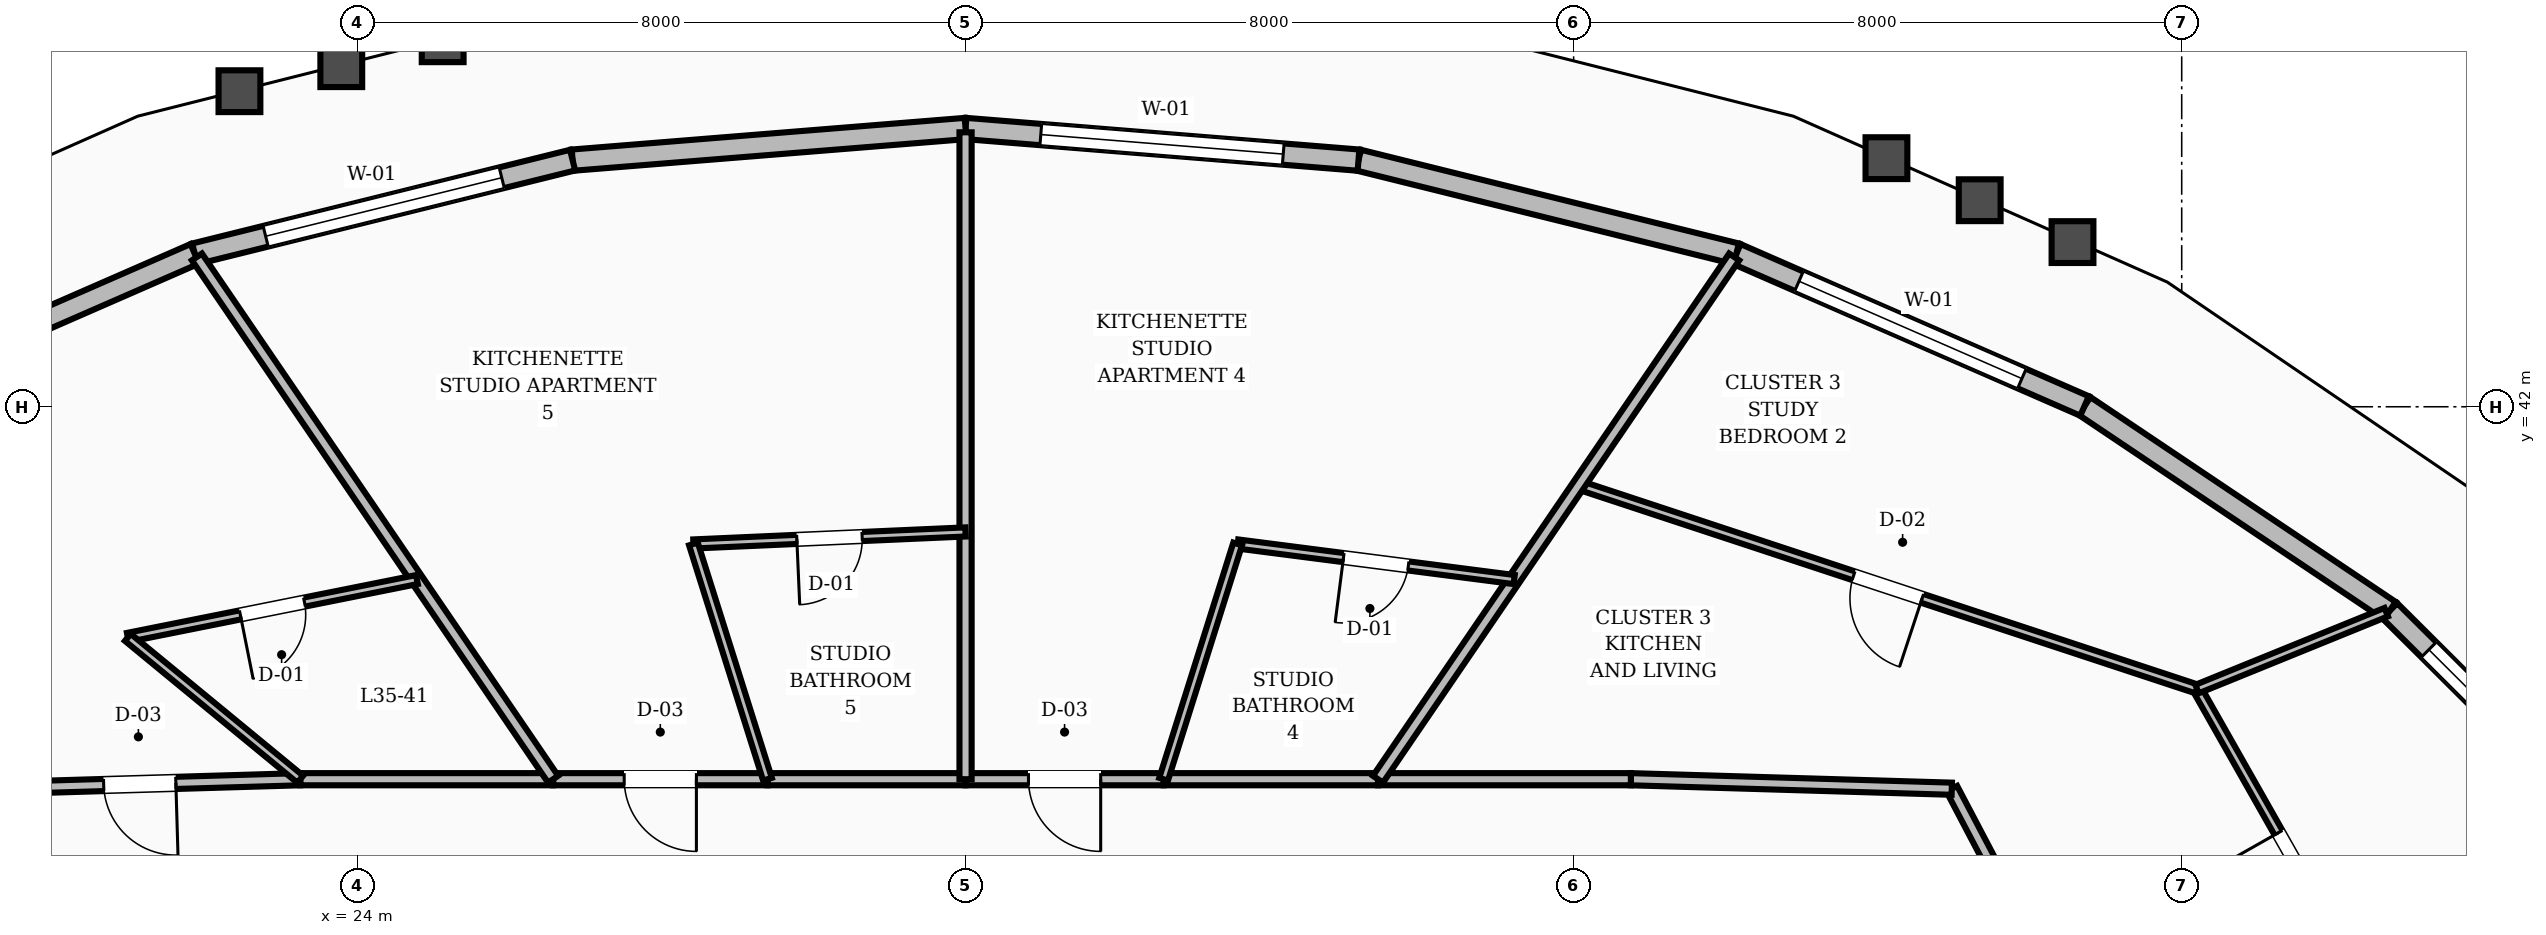
"""IFC4 building model, lengths in metres.
Left out: names, types, materials, properties, quantities, classifications, styles, units other than length and angle.
Written with IfcOpenShell. Run it as: python <this file> out.ifc"""

import sys

from ifc_helpers import new_model, si_unit, direction, frame, frame_2d, origin, place, context, subcontext, project, spatial, rectangle, extrude, element, fill, save


model = new_model("IFC4")
c1 = context("Model", 3, precision=1e-05, world=origin(), true_north=direction((0.0, 1.0)))
c2 = subcontext(c1, "Body", "Model", "MODEL_VIEW")
j1 = project(units=[si_unit("LENGTHUNIT", "METRE"), si_unit("PLANEANGLEUNIT", "RADIAN")], contexts=[c1])
p1 = place(None, origin())
s1 = spatial("IfcSite", under=j1, at=p1, CompositionType="ELEMENT")
p2 = place(p1, origin())
s2 = spatial("IfcBuilding", under=s1, at=p2, CompositionType="ELEMENT")
p3 = place(p2, frame((0.0, 0.0, 138.8)))
s3 = spatial("IfcBuildingStorey", under=s2, at=p3, CompositionType="ELEMENT", Elevation=138.8)
p4 = place(p3, frame((54.032, 36.034, 0.0), z_axis=(0.0, 0.0, 1.0), x_axis=(-0.708522616078, 0.705688105686, 0.0)))
e1 = element("IfcWall", 1, at=p4, inside=s3, PredefinedType="STANDARD", context=c2, shape_type="SweptSolid", body=[
    extrude(rectangle(XDim=4.651, YDim=0.28, at=frame_2d((2.326, 0.0))), origin(), (0.0, 0.0, 1.0), 2.82),
])
p5 = place(p4, frame((0.726, 0.0, 0.8)))
e2 = element("IfcOpeningElement", 2, at=p5, cuts=e1, PredefinedType="OPENING", context=c2, shape_type="SweptSolid", body=[
    extrude(rectangle(XDim=3.2, YDim=1.65, at=frame_2d((1.6, 0.825))), frame((0.0, 0.15, 0.0), z_axis=(0.0, -1.0, 0.0), x_axis=(1.0, 0.0, 0.0)), (0.0, 0.0, 1.0), 0.3),
])
p6 = place(p3, frame((50.737, 39.316, 0.0), z_axis=(0.0, 0.0, 1.0), x_axis=(-0.830431041812, 0.557121427334, 0.0)))
e3 = element("IfcWall", 3, at=p6, inside=s3, PredefinedType="STANDARD", context=c2, shape_type="SweptSolid", body=[
    extrude(rectangle(XDim=4.835, YDim=0.28, at=frame_2d((2.417, 0.0))), origin(), (0.0, 0.0, 1.0), 2.82),
])
p7 = place(p3, frame((46.722, 42.01, 0.0), z_axis=(0.0, 0.0, 1.0), x_axis=(-0.916348879192, 0.400380733307, 0.0)))
e4 = element("IfcWall", 4, at=p7, inside=s3, PredefinedType="STANDARD", context=c2, shape_type="SweptSolid", body=[
    extrude(rectangle(XDim=5.0, YDim=0.28, at=frame_2d((2.5, 0.0))), origin(), (0.0, 0.0, 1.0), 2.82),
])
p8 = place(p7, frame((0.9, 0.0, 0.8)))
e5 = element("IfcOpeningElement", 5, at=p8, cuts=e4, PredefinedType="OPENING", context=c2, shape_type="SweptSolid", body=[
    extrude(rectangle(XDim=3.2, YDim=1.65, at=frame_2d((1.6, 0.825))), frame((0.0, 0.15, 0.0), z_axis=(0.0, -1.0, 0.0), x_axis=(1.0, 0.0, 0.0)), (0.0, 0.0, 1.0), 0.3),
])
p9 = place(p3, frame((42.14, 44.012, 0.0), z_axis=(0.0, 0.0, 1.0), x_axis=(-0.970600650036, 0.240695613066, 0.0)))
e6 = element("IfcWall", 6, at=p9, inside=s3, PredefinedType="STANDARD", context=c2, shape_type="SweptSolid", body=[
    extrude(rectangle(XDim=5.121, YDim=0.28, at=frame_2d((2.561, 0.0))), origin(), (0.0, 0.0, 1.0), 2.82),
])
p10 = place(p3, frame((37.17, 45.245, 0.0), z_axis=(0.0, 0.0, 1.0), x_axis=(-0.996773984809, 0.080259723452, 0.0)))
e7 = element("IfcWall", 7, at=p10, inside=s3, PredefinedType="STANDARD", context=c2, shape_type="SweptSolid", body=[
    extrude(rectangle(XDim=5.187, YDim=0.28, at=frame_2d((2.593, 0.0))), origin(), (0.0, 0.0, 1.0), 2.82),
])
p11 = place(p10, frame((0.993, 0.0, 0.8)))
e8 = element("IfcOpeningElement", 8, at=p11, cuts=e7, PredefinedType="OPENING", context=c2, shape_type="SweptSolid", body=[
    extrude(rectangle(XDim=3.2, YDim=1.65, at=frame_2d((1.6, 0.825))), frame((0.0, 0.15, 0.0), z_axis=(0.0, -1.0, 0.0), x_axis=(1.0, 0.0, 0.0)), (0.0, 0.0, 1.0), 0.3),
])
p12 = place(p3, frame((32.0, 45.661, 0.0), z_axis=(0.0, 0.0, 1.0), x_axis=(-0.996773984809, -0.080259723452, 0.0)))
e9 = element("IfcWall", 9, at=p12, inside=s3, PredefinedType="STANDARD", context=c2, shape_type="SweptSolid", body=[
    extrude(rectangle(XDim=5.187, YDim=0.28, at=frame_2d((2.593, 0.0))), origin(), (0.0, 0.0, 1.0), 2.82),
])
p13 = place(p3, frame((26.83, 45.245, 0.0), z_axis=(0.0, 0.0, 1.0), x_axis=(-0.970600650036, -0.240695613066, 0.0)))
e10 = element("IfcWall", 10, at=p13, inside=s3, PredefinedType="STANDARD", context=c2, shape_type="SweptSolid", body=[
    extrude(rectangle(XDim=5.121, YDim=0.28, at=frame_2d((2.561, 0.0))), origin(), (0.0, 0.0, 1.0), 2.82),
])
p14 = place(p13, frame((0.961, 0.0, 0.8)))
e11 = element("IfcOpeningElement", 11, at=p14, cuts=e10, PredefinedType="OPENING", context=c2, shape_type="SweptSolid", body=[
    extrude(rectangle(XDim=3.2, YDim=1.65, at=frame_2d((1.6, 0.825))), frame((0.0, 0.15, 0.0), z_axis=(0.0, -1.0, 0.0), x_axis=(1.0, 0.0, 0.0)), (0.0, 0.0, 1.0), 0.3),
])
p15 = place(p3, frame((21.86, 44.012, 0.0), z_axis=(0.0, 0.0, 1.0), x_axis=(-0.916348879192, -0.400380733307, 0.0)))
e12 = element("IfcWall", 12, at=p15, inside=s3, PredefinedType="STANDARD", context=c2, shape_type="SweptSolid", body=[
    extrude(rectangle(XDim=5.0, YDim=0.28, at=frame_2d((2.5, 0.0))), origin(), (0.0, 0.0, 1.0), 2.82),
])
p16 = place(p3, frame((46.65, 33.789, 0.0), z_axis=(0.0, 0.0, 1.0), x_axis=(-0.46527115782, 0.885168204185, 0.0)))
e13 = element("IfcWall", 13, at=p16, inside=s3, PredefinedType="SOLIDWALL", context=c2, shape_type="SweptSolid", body=[
    extrude(rectangle(XDim=3.6, YDim=0.16, at=frame_2d((1.8, 0.0))), origin(), (0.0, 0.0, 1.0), 2.8),
])
p17 = place(p16, frame((1.3, 0.0, 0.0)))
e14 = element("IfcOpeningElement", 14, at=p17, cuts=e13, PredefinedType="OPENING", context=c2, shape_type="SweptSolid", body=[
    extrude(rectangle(XDim=1.0, YDim=2.1, at=frame_2d((0.5, 1.05))), frame((0.0, 0.09, 0.0), z_axis=(0.0, -1.0, 0.0), x_axis=(1.0, 0.0, 0.0)), (0.0, 0.0, 1.0), 0.18),
])
p18 = place(p3, frame((44.975, 36.975, 0.0), z_axis=(0.0, 0.0, 1.0), x_axis=(-0.999561990195, 0.029594387265, 0.0)))
e15 = element("IfcWall", 15, at=p18, inside=s3, PredefinedType="SOLIDWALL", context=c2, shape_type="SweptSolid", body=[
    extrude(rectangle(XDim=4.224, YDim=0.16, at=frame_2d((2.112, 0.0))), origin(), (0.0, 0.0, 1.0), 2.8),
])
p19 = place(p3, frame((40.753, 37.1, 0.0), z_axis=(0.0, 0.0, 1.0), x_axis=(-1.0, 0.0, 0.0)))
e16 = element("IfcWall", 16, at=p19, inside=s3, PredefinedType="SOLIDWALL", context=c2, shape_type="SweptSolid", body=[
    extrude(rectangle(XDim=3.327, YDim=0.16, at=frame_2d((1.664, 0.0))), origin(), (0.0, 0.0, 1.0), 2.8),
])
p20 = place(p3, frame((37.426, 37.1, 0.0), z_axis=(0.0, 0.0, 1.0), x_axis=(-1.0, 0.0, 0.0)))
e17 = element("IfcWall", 17, at=p20, inside=s3, PredefinedType="SOLIDWALL", context=c2, shape_type="SweptSolid", body=[
    extrude(rectangle(XDim=2.821, YDim=0.16, at=frame_2d((1.41, 0.0))), origin(), (0.0, 0.0, 1.0), 2.8),
])
p21 = place(p3, frame((34.606, 37.1, 0.0), z_axis=(0.0, 0.0, 1.0), x_axis=(-1.0, 0.0, 0.0)))
e18 = element("IfcWall", 18, at=p21, inside=s3, PredefinedType="SOLIDWALL", context=c2, shape_type="SweptSolid", body=[
    extrude(rectangle(XDim=2.606, YDim=0.16, at=frame_2d((1.303, 0.0))), origin(), (0.0, 0.0, 1.0), 2.8),
])
p22 = place(p21, frame((0.828, 0.0, 0.0)))
e19 = element("IfcOpeningElement", 19, at=p22, cuts=e18, PredefinedType="OPENING", context=c2, shape_type="SweptSolid", body=[
    extrude(rectangle(XDim=0.95, YDim=2.1, at=frame_2d((0.475, 1.05))), frame((0.0, 0.09, 0.0), z_axis=(0.0, -1.0, 0.0), x_axis=(1.0, 0.0, 0.0)), (0.0, 0.0, 1.0), 0.18),
])
p23 = place(p3, frame((32.0, 37.1, 0.0), z_axis=(0.0, 0.0, 1.0), x_axis=(-1.0, 0.0, 0.0)))
e20 = element("IfcWall", 20, at=p23, inside=s3, PredefinedType="SOLIDWALL", context=c2, shape_type="SweptSolid", body=[
    extrude(rectangle(XDim=2.606, YDim=0.16, at=frame_2d((1.303, 0.0))), origin(), (0.0, 0.0, 1.0), 2.8),
])
p24 = place(p3, frame((29.394, 37.1, 0.0), z_axis=(0.0, 0.0, 1.0), x_axis=(-1.0, 0.0, 0.0)))
e21 = element("IfcWall", 21, at=p24, inside=s3, PredefinedType="SOLIDWALL", context=c2, shape_type="SweptSolid", body=[
    extrude(rectangle(XDim=2.821, YDim=0.16, at=frame_2d((1.41, 0.0))), origin(), (0.0, 0.0, 1.0), 2.8),
])
p25 = place(p24, frame((0.935, 0.0, 0.0)))
e22 = element("IfcOpeningElement", 22, at=p25, cuts=e21, PredefinedType="OPENING", context=c2, shape_type="SweptSolid", body=[
    extrude(rectangle(XDim=0.95, YDim=2.1, at=frame_2d((0.475, 1.05))), frame((0.0, 0.09, 0.0), z_axis=(0.0, -1.0, 0.0), x_axis=(1.0, 0.0, 0.0)), (0.0, 0.0, 1.0), 0.18),
])
p26 = place(p3, frame((26.574, 37.1, 0.0), z_axis=(0.0, 0.0, 1.0), x_axis=(-1.0, 0.0, 0.0)))
e23 = element("IfcWall", 23, at=p26, inside=s3, PredefinedType="SOLIDWALL", context=c2, shape_type="SweptSolid", body=[
    extrude(rectangle(XDim=3.327, YDim=0.16, at=frame_2d((1.664, 0.0))), origin(), (0.0, 0.0, 1.0), 2.8),
])
p27 = place(p3, frame((23.247, 37.1, 0.0), z_axis=(0.0, 0.0, 1.0), x_axis=(-0.999561990195, -0.029594387265, 0.0)))
e24 = element("IfcWall", 24, at=p27, inside=s3, PredefinedType="SOLIDWALL", context=c2, shape_type="SweptSolid", body=[
    extrude(rectangle(XDim=4.224, YDim=0.16, at=frame_2d((2.112, 0.0))), origin(), (0.0, 0.0, 1.0), 2.8),
])
p28 = place(p27, frame((1.637, 0.0, 0.0)))
e25 = element("IfcOpeningElement", 25, at=p28, cuts=e24, PredefinedType="OPENING", context=c2, shape_type="SweptSolid", body=[
    extrude(rectangle(XDim=0.95, YDim=2.1, at=frame_2d((0.475, 1.05))), frame((0.0, 0.09, 0.0), z_axis=(0.0, -1.0, 0.0), x_axis=(1.0, 0.0, 0.0)), (0.0, 0.0, 1.0), 0.18),
])
p29 = place(p3, frame((52.156, 31.312, 0.0), z_axis=(0.0, 0.0, 1.0), x_axis=(-0.493164704103, 0.869935960072, 0.0)))
e26 = element("IfcWall", 26, at=p29, inside=s3, PredefinedType="PARTITIONING", context=c2, shape_type="SweptSolid", body=[
    extrude(rectangle(XDim=8.017, YDim=0.12, at=frame_2d((4.008, 0.0))), origin(), (0.0, 0.0, 1.0), 2.8),
])
p30 = place(p29, frame((4.895, 0.0, 0.0)))
e27 = element("IfcOpeningElement", 27, at=p30, cuts=e26, PredefinedType="OPENING", context=c2, shape_type="SweptSolid", body=[
    extrude(rectangle(XDim=0.95, YDim=2.1, at=frame_2d((0.475, 1.05))), frame((0.0, 0.07, 0.0), z_axis=(0.0, -1.0, 0.0), x_axis=(1.0, 0.0, 0.0)), (0.0, 0.0, 1.0), 0.14),
])
p31 = place(p3, frame((48.202, 38.286, 0.0), z_axis=(0.0, 0.0, 1.0), x_axis=(-0.949636450875, 0.313353811482, 0.0)))
e28 = element("IfcWall", 28, at=p31, inside=s3, PredefinedType="PARTITIONING", context=c2, shape_type="SweptSolid", body=[
    extrude(rectangle(XDim=8.567, YDim=0.12, at=frame_2d((4.284, 0.0))), origin(), (0.0, 0.0, 1.0), 2.8),
])
p32 = place(p31, frame((3.809, 0.0, 0.0)))
e29 = element("IfcOpeningElement", 29, at=p32, cuts=e28, PredefinedType="OPENING", context=c2, shape_type="SweptSolid", body=[
    extrude(rectangle(XDim=0.95, YDim=2.1, at=frame_2d((0.475, 1.05))), frame((0.0, 0.07, 0.0), z_axis=(0.0, -1.0, 0.0), x_axis=(1.0, 0.0, 0.0)), (0.0, 0.0, 1.0), 0.14),
])
p33 = place(p3, frame((48.202, 38.286, 0.0), z_axis=(0.0, 0.0, 1.0), x_axis=(0.926425973207, 0.376476979598, 0.0)))
e30 = element("IfcWall", 30, at=p33, inside=s3, PredefinedType="PARTITIONING", context=c2, shape_type="SweptSolid", body=[
    extrude(rectangle(XDim=2.687, YDim=0.12, at=frame_2d((1.343, 0.0))), origin(), (0.0, 0.0, 1.0), 2.8),
])
p34 = place(p3, frame((37.426, 37.1, 0.0), z_axis=(0.0, 0.0, 1.0), x_axis=(0.563462523852, 0.826141624792, 0.0)))
e31 = element("IfcWall", 31, at=p34, inside=s3, PredefinedType="SOLIDWALL", context=c2, shape_type="SweptSolid", body=[
    extrude(rectangle(XDim=8.316, YDim=0.16, at=frame_2d((4.158, 0.0))), origin(), (0.0, 0.0, 1.0), 2.8),
])
p35 = place(p3, frame((39.218, 39.727, 0.0), z_axis=(0.0, 0.0, 1.0), x_axis=(-0.991815435092, 0.127679844587, 0.0)))
e32 = element("IfcWall", 32, at=p35, inside=s3, PredefinedType="PARTITIONING", context=c2, shape_type="SweptSolid", body=[
    extrude(rectangle(XDim=3.667, YDim=0.12, at=frame_2d((1.834, 0.0))), origin(), (0.0, 0.0, 1.0), 2.8),
])
p36 = place(p35, frame((1.404, 0.0, 0.0)))
e33 = element("IfcOpeningElement", 33, at=p36, cuts=e32, PredefinedType="OPENING", context=c2, shape_type="SweptSolid", body=[
    extrude(rectangle(XDim=0.86, YDim=2.1, at=frame_2d((0.43, 1.05))), frame((0.0, 0.07, 0.0), z_axis=(0.0, -1.0, 0.0), x_axis=(1.0, 0.0, 0.0)), (0.0, 0.0, 1.0), 0.14),
])
p37 = place(p3, frame((34.606, 37.1, 0.0), z_axis=(0.0, 0.0, 1.0), x_axis=(0.30031376725, 0.953840469471, 0.0)))
e34 = element("IfcWall", 34, at=p37, inside=s3, PredefinedType="PARTITIONING", context=c2, shape_type="SweptSolid", body=[
    extrude(rectangle(XDim=3.244, YDim=0.12, at=frame_2d((1.622, 0.0))), origin(), (0.0, 0.0, 1.0), 2.8),
])
p38 = place(p3, frame((32.0, 37.1, 0.0), z_axis=(0.0, 0.0, 1.0), x_axis=(0.0, 1.0, 0.0)))
e35 = element("IfcWall", 35, at=p38, inside=s3, PredefinedType="SOLIDWALL", context=c2, shape_type="SweptSolid", body=[
    extrude(rectangle(XDim=8.511, YDim=0.16, at=frame_2d((4.255, 0.0))), origin(), (0.0, 0.0, 1.0), 2.8),
])
p39 = place(p3, frame((32.0, 40.353, 0.0), z_axis=(0.0, 0.0, 1.0), x_axis=(-0.999025056088, -0.044146770073, 0.0)))
e36 = element("IfcWall", 36, at=p39, inside=s3, PredefinedType="PARTITIONING", context=c2, shape_type="SweptSolid", body=[
    extrude(rectangle(XDim=3.583, YDim=0.12, at=frame_2d((1.792, 0.0))), origin(), (0.0, 0.0, 1.0), 2.8),
])
p40 = place(p39, frame((1.362, 0.0, 0.0)))
e37 = element("IfcOpeningElement", 37, at=p40, cuts=e36, PredefinedType="OPENING", context=c2, shape_type="SweptSolid", body=[
    extrude(rectangle(XDim=0.86, YDim=2.1, at=frame_2d((0.43, 1.05))), frame((0.0, 0.07, 0.0), z_axis=(0.0, -1.0, 0.0), x_axis=(1.0, 0.0, 0.0)), (0.0, 0.0, 1.0), 0.14),
])
p41 = place(p3, frame((29.394, 37.1, 0.0), z_axis=(0.0, 0.0, 1.0), x_axis=(-0.30031376725, 0.953840469471, 0.0)))
e38 = element("IfcWall", 38, at=p41, inside=s3, PredefinedType="PARTITIONING", context=c2, shape_type="SweptSolid", body=[
    extrude(rectangle(XDim=3.244, YDim=0.12, at=frame_2d((1.622, 0.0))), origin(), (0.0, 0.0, 1.0), 2.8),
])
p42 = place(p3, frame((26.574, 37.1, 0.0), z_axis=(0.0, 0.0, 1.0), x_axis=(-0.563462523852, 0.826141624792, 0.0)))
e39 = element("IfcWall", 39, at=p42, inside=s3, PredefinedType="SOLIDWALL", context=c2, shape_type="SweptSolid", body=[
    extrude(rectangle(XDim=8.316, YDim=0.16, at=frame_2d((4.158, 0.0))), origin(), (0.0, 0.0, 1.0), 2.8),
])
p43 = place(p3, frame((24.782, 39.727, 0.0), z_axis=(0.0, 0.0, 1.0), x_axis=(-0.980580675691, -0.196116135138, 0.0)))
e40 = element("IfcWall", 40, at=p43, inside=s3, PredefinedType="PARTITIONING", context=c2, shape_type="SweptSolid", body=[
    extrude(rectangle(XDim=3.879, YDim=0.12, at=frame_2d((1.939, 0.0))), origin(), (0.0, 0.0, 1.0), 2.8),
])
p44 = place(p43, frame((1.51, 0.0, 0.0)))
e41 = element("IfcOpeningElement", 41, at=p44, cuts=e40, PredefinedType="OPENING", context=c2, shape_type="SweptSolid", body=[
    extrude(rectangle(XDim=0.86, YDim=2.1, at=frame_2d((0.43, 1.05))), frame((0.0, 0.07, 0.0), z_axis=(0.0, -1.0, 0.0), x_axis=(1.0, 0.0, 0.0)), (0.0, 0.0, 1.0), 0.14),
])
p45 = place(p3, frame((23.247, 37.1, 0.0), z_axis=(0.0, 0.0, 1.0), x_axis=(-0.772280465458, 0.63528173488, 0.0)))
e42 = element("IfcWall", 42, at=p45, inside=s3, PredefinedType="PARTITIONING", context=c2, shape_type="SweptSolid", body=[
    extrude(rectangle(XDim=2.937, YDim=0.12, at=frame_2d((1.468, 0.0))), origin(), (0.0, 0.0, 1.0), 2.8),
])
p46 = place(p5, origin())
e43 = element("IfcWindow", 43, at=p46, inside=s3, PartitioningType="SINGLE_PANEL", PredefinedType="WINDOW", context=c2, shape_type="SweptSolid", body=[
    extrude(rectangle(XDim=3.2, YDim=1.65, at=frame_2d((1.6, 0.825))), frame((0.0, 0.03, 0.0), z_axis=(0.0, -1.0, 0.0), x_axis=(1.0, 0.0, 0.0)), (0.0, 0.0, 1.0), 0.06),
])
fill(e2, e43)
p47 = place(p8, origin())
e44 = element("IfcWindow", 44, at=p47, inside=s3, PartitioningType="SINGLE_PANEL", PredefinedType="WINDOW", context=c2, shape_type="SweptSolid", body=[
    extrude(rectangle(XDim=3.2, YDim=1.65, at=frame_2d((1.6, 0.825))), frame((0.0, 0.03, 0.0), z_axis=(0.0, -1.0, 0.0), x_axis=(1.0, 0.0, 0.0)), (0.0, 0.0, 1.0), 0.06),
])
fill(e5, e44)
p48 = place(p11, origin())
e45 = element("IfcWindow", 45, at=p48, inside=s3, PartitioningType="SINGLE_PANEL", PredefinedType="WINDOW", context=c2, shape_type="SweptSolid", body=[
    extrude(rectangle(XDim=3.2, YDim=1.65, at=frame_2d((1.6, 0.825))), frame((0.0, 0.03, 0.0), z_axis=(0.0, -1.0, 0.0), x_axis=(1.0, 0.0, 0.0)), (0.0, 0.0, 1.0), 0.06),
])
fill(e8, e45)
p49 = place(p14, origin())
e46 = element("IfcWindow", 46, at=p49, inside=s3, PartitioningType="SINGLE_PANEL", PredefinedType="WINDOW", context=c2, shape_type="SweptSolid", body=[
    extrude(rectangle(XDim=3.2, YDim=1.65, at=frame_2d((1.6, 0.825))), frame((0.0, 0.03, 0.0), z_axis=(0.0, -1.0, 0.0), x_axis=(1.0, 0.0, 0.0)), (0.0, 0.0, 1.0), 0.06),
])
fill(e11, e46)
p50 = place(p30, origin())
e47 = element("IfcDoor", 47, at=p50, inside=s3, OperationType="SINGLE_SWING_RIGHT", PredefinedType="DOOR", context=c2, shape_type="SweptSolid", body=[
    extrude(rectangle(XDim=0.95, YDim=2.1, at=frame_2d((0.475, 1.05))), frame((0.0, 0.025, 0.0), z_axis=(0.0, -1.0, 0.0), x_axis=(1.0, 0.0, 0.0)), (0.0, 0.0, 1.0), 0.05),
])
fill(e27, e47)
p51 = place(p32, origin())
e48 = element("IfcDoor", 48, at=p51, inside=s3, OperationType="SINGLE_SWING_LEFT", PredefinedType="DOOR", context=c2, shape_type="SweptSolid", body=[
    extrude(rectangle(XDim=0.95, YDim=2.1, at=frame_2d((0.475, 1.05))), frame((0.0, 0.025, 0.0), z_axis=(0.0, -1.0, 0.0), x_axis=(1.0, 0.0, 0.0)), (0.0, 0.0, 1.0), 0.05),
])
fill(e29, e48)
p52 = place(p36, origin())
e49 = element("IfcDoor", 49, at=p52, inside=s3, OperationType="SINGLE_SWING_RIGHT", PredefinedType="DOOR", context=c2, shape_type="SweptSolid", body=[
    extrude(rectangle(XDim=0.86, YDim=2.1, at=frame_2d((0.43, 1.05))), frame((0.0, 0.025, 0.0), z_axis=(0.0, -1.0, 0.0), x_axis=(1.0, 0.0, 0.0)), (0.0, 0.0, 1.0), 0.05),
])
fill(e33, e49)
p53 = place(p22, origin())
e50 = element("IfcDoor", 50, at=p53, inside=s3, OperationType="SINGLE_SWING_LEFT", PredefinedType="DOOR", context=c2, shape_type="SweptSolid", body=[
    extrude(rectangle(XDim=0.95, YDim=2.1, at=frame_2d((0.475, 1.05))), frame((0.0, 0.025, 0.0), z_axis=(0.0, -1.0, 0.0), x_axis=(1.0, 0.0, 0.0)), (0.0, 0.0, 1.0), 0.05),
])
fill(e19, e50)
p54 = place(p40, origin())
e51 = element("IfcDoor", 51, at=p54, inside=s3, OperationType="SINGLE_SWING_RIGHT", PredefinedType="DOOR", context=c2, shape_type="SweptSolid", body=[
    extrude(rectangle(XDim=0.86, YDim=2.1, at=frame_2d((0.43, 1.05))), frame((0.0, 0.025, 0.0), z_axis=(0.0, -1.0, 0.0), x_axis=(1.0, 0.0, 0.0)), (0.0, 0.0, 1.0), 0.05),
])
fill(e37, e51)
p55 = place(p25, origin())
e52 = element("IfcDoor", 52, at=p55, inside=s3, OperationType="SINGLE_SWING_LEFT", PredefinedType="DOOR", context=c2, shape_type="SweptSolid", body=[
    extrude(rectangle(XDim=0.95, YDim=2.1, at=frame_2d((0.475, 1.05))), frame((0.0, 0.025, 0.0), z_axis=(0.0, -1.0, 0.0), x_axis=(1.0, 0.0, 0.0)), (0.0, 0.0, 1.0), 0.05),
])
fill(e22, e52)
p56 = place(p44, origin())
e53 = element("IfcDoor", 53, at=p56, inside=s3, OperationType="SINGLE_SWING_RIGHT", PredefinedType="DOOR", context=c2, shape_type="SweptSolid", body=[
    extrude(rectangle(XDim=0.86, YDim=2.1, at=frame_2d((0.43, 1.05))), frame((0.0, 0.025, 0.0), z_axis=(0.0, -1.0, 0.0), x_axis=(1.0, 0.0, 0.0)), (0.0, 0.0, 1.0), 0.05),
])
fill(e41, e53)
p57 = place(p28, origin())
e54 = element("IfcDoor", 54, at=p57, inside=s3, OperationType="SINGLE_SWING_LEFT", PredefinedType="DOOR", context=c2, shape_type="SweptSolid", body=[
    extrude(rectangle(XDim=0.95, YDim=2.1, at=frame_2d((0.475, 1.05))), frame((0.0, 0.025, 0.0), z_axis=(0.0, -1.0, 0.0), x_axis=(1.0, 0.0, 0.0)), (0.0, 0.0, 1.0), 0.05),
])
fill(e25, e54)
save(model, sys.argv[1])
